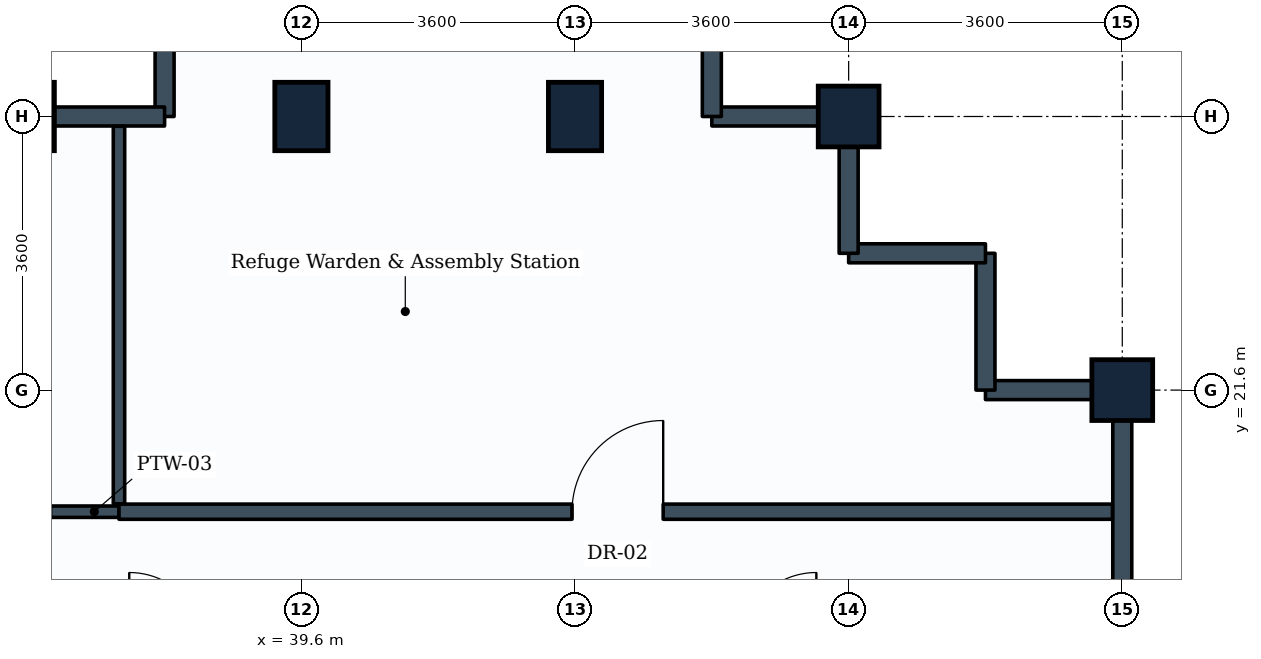
"""IFC4 building model, lengths in metres.
Left out: names, types, materials, properties, quantities, classifications, styles, units other than length and angle.
Written with IfcOpenShell. Run it as: python <this file> out.ifc"""

import sys

from ifc_helpers import new_model, si_unit, direction, frame, frame_2d, origin, origin_2d, place, context, subcontext, project, spatial, rectangle, extrude, element, fill, save


model = new_model("IFC4")
c1 = context("Model", 3, precision=1e-05, world=origin(), true_north=direction((0.0, 1.0)))
c2 = subcontext(c1, "Body", "Model", "MODEL_VIEW")
j1 = project(units=[si_unit("LENGTHUNIT", "METRE"), si_unit("PLANEANGLEUNIT", "RADIAN")], contexts=[c1])
p1 = place(None, origin())
s1 = spatial("IfcSite", under=j1, at=p1, CompositionType="ELEMENT")
p2 = place(p1, origin())
s2 = spatial("IfcBuilding", under=s1, at=p2, CompositionType="ELEMENT")
p3 = place(p2, frame((0.0, 0.0, 213.8)))
s3 = spatial("IfcBuildingStorey", under=s2, at=p3, CompositionType="ELEMENT", Elevation=213.8)
for number, where, z_axis, x_axis in (
    (1, (36.0, 25.2, 0.0), (0.0, 0.0, 1.0), (1.0, 0.0, 0.0)),
    (2, (39.6, 25.2, 0.0), (0.0, 0.0, 1.0), (1.0, 0.0, 0.0)),
    (3, (43.2, 25.2, 0.0), (0.0, 0.0, 1.0), (1.0, 0.0, 0.0)),
):
    element("IfcColumn", number, at=place(p3, frame(where, z_axis=z_axis, x_axis=x_axis)), inside=s3, PredefinedType="COLUMN", context=c2, shape_type="SweptSolid", body=[
        extrude(rectangle(XDim=0.7, YDim=0.9, at=origin_2d()), origin(), (0.0, 0.0, 1.0), 3.6),
    ])
for number, where, z_axis, x_axis in (
    (4, (46.8, 25.2, 0.0), (0.0, 0.0, 1.0), (1.0, 0.0, 0.0)),
    (5, (50.4, 21.6, 0.0), (0.0, 0.0, 1.0), (0.0, 1.0, 0.0)),
):
    element("IfcColumn", number, at=place(p3, frame(where, z_axis=z_axis, x_axis=x_axis)), inside=s3, PredefinedType="COLUMN", context=c2, shape_type="SweptSolid", body=[
        extrude(rectangle(XDim=0.8, YDim=0.8, at=origin_2d()), origin(), (0.0, 0.0, 1.0), 3.6),
    ])
p4 = place(p3, frame((50.4, 21.6, 0.0), z_axis=(0.0, 0.0, 1.0), x_axis=(0.0, -1.0, 0.0)))
e6 = element("IfcWall", 6, at=p4, inside=s3, PredefinedType="STANDARD", context=c2, shape_type="SweptSolid", body=[
    extrude(rectangle(XDim=3.6, YDim=0.25, at=frame_2d((1.8, 0.0))), origin(), (0.0, 0.0, 1.0), 2.73),
])
p5 = place(p3, frame((48.6, 21.6, 0.0), z_axis=(0.0, 0.0, 1.0), x_axis=(1.0, 0.0, 0.0)))
e7 = element("IfcWall", 7, at=p5, inside=s3, PredefinedType="STANDARD", context=c2, shape_type="SweptSolid", body=[
    extrude(rectangle(XDim=1.8, YDim=0.25, at=frame_2d((0.9, 0.0))), origin(), (0.0, 0.0, 1.0), 2.73),
])
p6 = place(p3, frame((48.6, 23.4, 0.0), z_axis=(0.0, 0.0, 1.0), x_axis=(0.0, -1.0, 0.0)))
e8 = element("IfcWall", 8, at=p6, inside=s3, PredefinedType="STANDARD", context=c2, shape_type="SweptSolid", body=[
    extrude(rectangle(XDim=1.8, YDim=0.25, at=frame_2d((0.9, 0.0))), origin(), (0.0, 0.0, 1.0), 3.335),
])
p7 = place(p3, frame((46.8, 23.4, 0.0), z_axis=(0.0, 0.0, 1.0), x_axis=(1.0, 0.0, 0.0)))
e9 = element("IfcWall", 9, at=p7, inside=s3, PredefinedType="STANDARD", context=c2, shape_type="SweptSolid", body=[
    extrude(rectangle(XDim=1.8, YDim=0.25, at=frame_2d((0.9, 0.0))), origin(), (0.0, 0.0, 1.0), 3.335),
])
for number, where, z_axis, x_axis in (
    (10, (46.8, 25.2, 0.0), (0.0, 0.0, 1.0), (0.0, -1.0, 0.0)),
    (11, (45.0, 25.2, 0.0), (0.0, 0.0, 1.0), (1.0, 0.0, 0.0)),
):
    element("IfcWall", number, at=place(p3, frame(where, z_axis=z_axis, x_axis=x_axis)), inside=s3, PredefinedType="STANDARD", context=c2, shape_type="SweptSolid", body=[
        extrude(rectangle(XDim=1.8, YDim=0.25, at=frame_2d((0.9, 0.0))), origin(), (0.0, 0.0, 1.0), 2.73),
    ])
for number, where, z_axis, x_axis in (
    (12, (45.0, 27.3, 0.0), (0.0, 0.0, 1.0), (0.0, -1.0, 0.0)),
    (13, (37.8, 27.3, 0.0), (0.0, 0.0, 1.0), (0.0, -1.0, 0.0)),
):
    element("IfcWall", number, at=place(p3, frame(where, z_axis=z_axis, x_axis=x_axis)), inside=s3, PredefinedType="STANDARD", context=c2, shape_type="SweptSolid", body=[
        extrude(rectangle(XDim=2.1, YDim=0.25, at=frame_2d((1.05, 0.0))), origin(), (0.0, 0.0, 1.0), 2.73),
    ])
p8 = place(p3, frame((36.0, 25.2, 0.0), z_axis=(0.0, 0.0, 1.0), x_axis=(1.0, 0.0, 0.0)))
e14 = element("IfcWall", 14, at=p8, inside=s3, PredefinedType="STANDARD", context=c2, shape_type="SweptSolid", body=[
    extrude(rectangle(XDim=1.8, YDim=0.25, at=frame_2d((0.9, 0.0))), origin(), (0.0, 0.0, 1.0), 2.73),
])
p9 = place(p3, frame((34.4, 20.0, 0.0), z_axis=(0.0, 0.0, 1.0), x_axis=(1.0, 0.0, 0.0)))
e15 = element("IfcWall", 15, at=p9, inside=s3, PredefinedType="PARTITIONING", context=c2, shape_type="SweptSolid", body=[
    extrude(rectangle(XDim=2.8, YDim=0.15, at=frame_2d((1.4, 0.0))), origin(), (0.0, 0.0, 1.0), 3.06),
])
p10 = place(p9, frame((0.9, 0.0, 0.0)))
e16 = element("IfcOpeningElement", 16, at=p10, cuts=e15, PredefinedType="OPENING", context=c2, shape_type="SweptSolid", body=[
    extrude(rectangle(XDim=1.0, YDim=2.1, at=frame_2d((0.5, 1.05))), frame((0.0, 0.085, 0.0), z_axis=(0.0, -1.0, 0.0), x_axis=(1.0, 0.0, 0.0)), (0.0, 0.0, 1.0), 0.17),
])
p11 = place(p3, frame((37.2, 20.0, 0.0), z_axis=(0.0, 0.0, 1.0), x_axis=(1.0, 0.0, 0.0)))
e17 = element("IfcWall", 17, at=p11, inside=s3, PredefinedType="PARTITIONING", context=c2, shape_type="SweptSolid", body=[
    extrude(rectangle(XDim=13.071, YDim=0.2, at=frame_2d((6.536, 0.0))), origin(), (0.0, 0.0, 1.0), 2.73),
])
p12 = place(p11, frame((5.96, 0.0, 0.0)))
e18 = element("IfcOpeningElement", 18, at=p12, cuts=e17, PredefinedType="OPENING", context=c2, shape_type="SweptSolid", body=[
    extrude(rectangle(XDim=1.2, YDim=2.1, at=frame_2d((0.6, 1.05))), frame((0.0, 0.11, 0.0), z_axis=(0.0, -1.0, 0.0), x_axis=(1.0, 0.0, 0.0)), (0.0, 0.0, 1.0), 0.22),
])
p13 = place(p3, frame((37.2, 20.104, 0.0), z_axis=(0.0, 0.0, 1.0), x_axis=(0.0, 1.0, 0.0)))
e19 = element("IfcWall", 19, at=p13, inside=s3, PredefinedType="PARTITIONING", context=c2, shape_type="SweptSolid", body=[
    extrude(rectangle(XDim=4.967, YDim=0.15, at=frame_2d((2.483, 0.0))), origin(), (0.0, 0.0, 1.0), 2.73),
])
p14 = place(p12, origin())
e20 = element("IfcDoor", 20, at=p14, inside=s3, OperationType="SINGLE_SWING_RIGHT", PredefinedType="DOOR", context=c2, shape_type="SweptSolid", body=[
    extrude(rectangle(XDim=1.2, YDim=2.1, at=frame_2d((0.6, 1.05))), frame((0.0, 0.025, 0.0), z_axis=(0.0, -1.0, 0.0), x_axis=(1.0, 0.0, 0.0)), (0.0, 0.0, 1.0), 0.05),
])
fill(e18, e20)
save(model, sys.argv[1])
